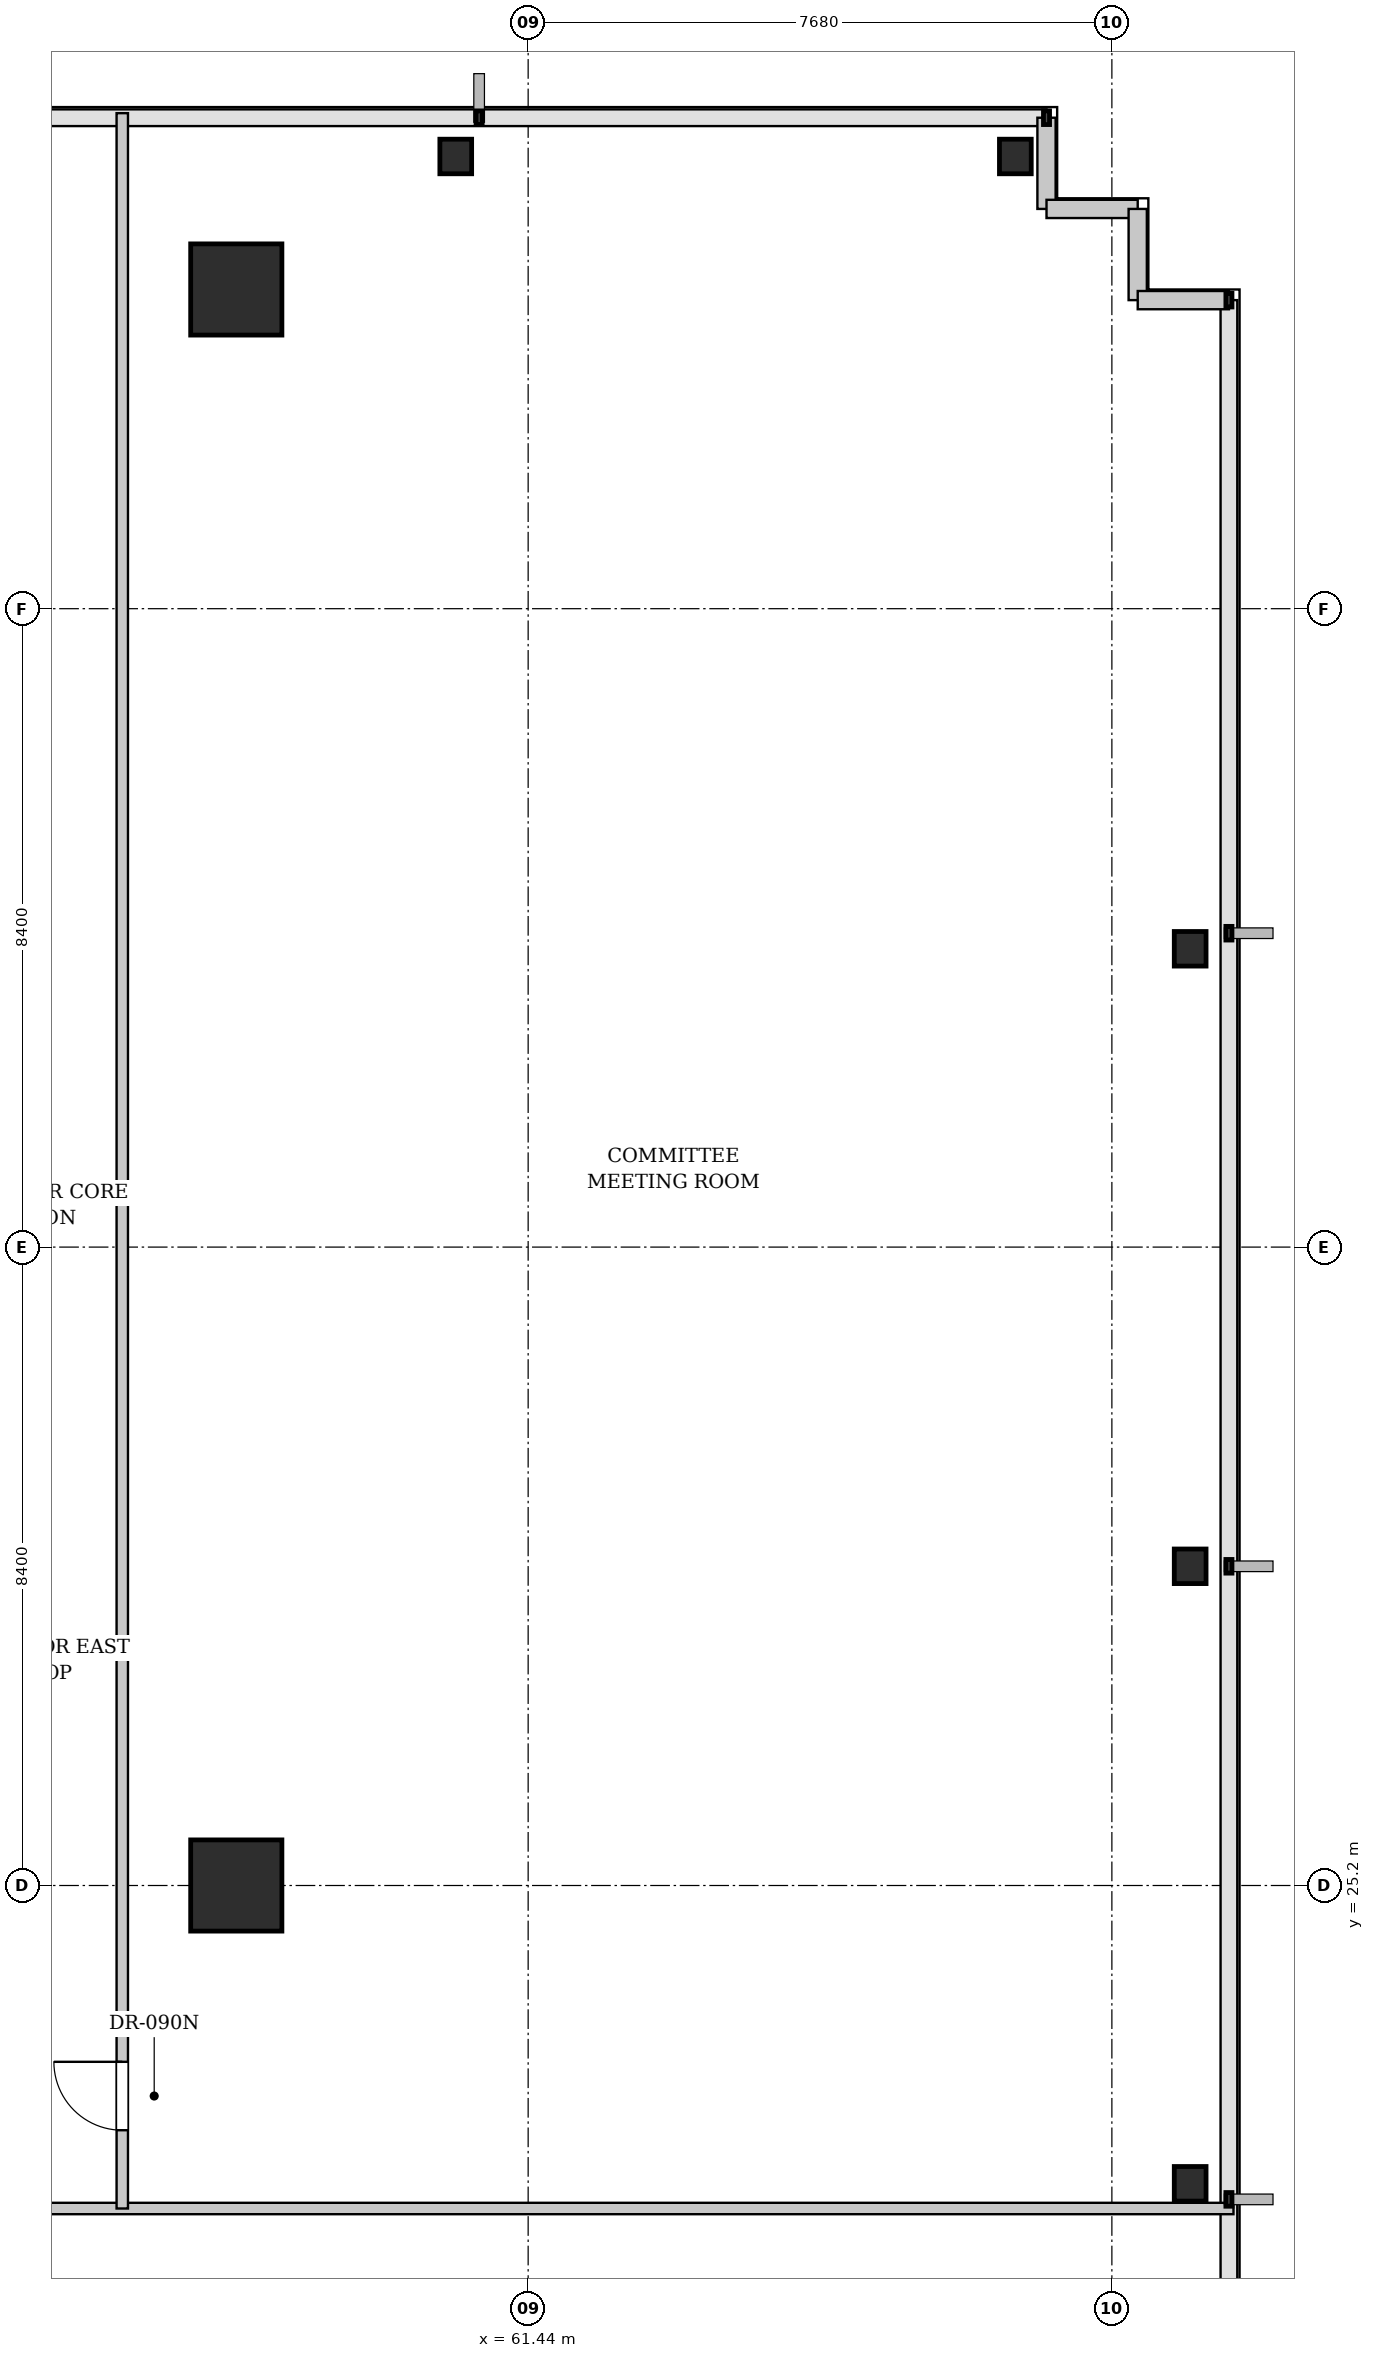
"""IFC4 building model, lengths in metres.
Left out: names, types, materials, properties, quantities, classifications, styles, units other than length and angle.
Written with IfcOpenShell. Run it as: python <this file> out.ifc"""

import sys

from ifc_helpers import new_model, si_unit, direction, frame, frame_2d, origin, origin_2d, place, context, subcontext, project, spatial, rectangle, i_section, extrude, element, fill, save


model = new_model("IFC4")
c1 = context("Model", 3, precision=1e-05, world=origin(), true_north=direction((0.0, 1.0)))
c2 = subcontext(c1, "Body", "Model", "MODEL_VIEW")
j1 = project(units=[si_unit("LENGTHUNIT", "METRE"), si_unit("PLANEANGLEUNIT", "RADIAN")], contexts=[c1])
p1 = place(None, origin())
s1 = spatial("IfcSite", under=j1, at=p1, CompositionType="ELEMENT")
p2 = place(p1, origin())
s2 = spatial("IfcBuilding", under=s1, at=p2, CompositionType="ELEMENT")
p3 = place(p2, frame((0.0, 0.0, 37.2)))
s3 = spatial("IfcBuildingStorey", under=s2, at=p3, CompositionType="ELEMENT", Elevation=37.2)
for number, where, z_axis, x_axis in (
    (1, (57.6, 25.2, 0.0), (0.0, 0.0, 1.0), (1.0, 0.0, 0.0)),
    (2, (57.6, 46.2, 0.0), (0.0, 0.0, 1.0), (1.0, 0.0, 0.0)),
):
    element("IfcColumn", number, at=place(p3, frame(where, z_axis=z_axis, x_axis=x_axis)), inside=s3, PredefinedType="COLUMN", context=c2, shape_type="SweptSolid", body=[
        extrude(rectangle(XDim=1.2, YDim=1.2, at=origin_2d()), origin(), (0.0, 0.0, 1.0), 3.4),
    ])
for number, where, z_axis, x_axis in (
    (3, (60.488, 47.95, 0.0), (0.0, 0.0, 1.0), (1.0, 0.0, 0.0)),
    (4, (67.85, 47.95, 0.0), (0.0, 0.0, 1.0), (1.0, 0.0, 0.0)),
    (5, (70.15, 21.275, 0.0), (0.0, 0.0, 1.0), (1.0, 0.0, 0.0)),
    (6, (70.15, 29.4, 0.0), (0.0, 0.0, 1.0), (1.0, 0.0, 0.0)),
    (7, (70.15, 37.525, 0.0), (0.0, 0.0, 1.0), (1.0, 0.0, 0.0)),
):
    element("IfcColumn", number, at=place(p3, frame(where, z_axis=z_axis, x_axis=x_axis)), inside=s3, PredefinedType="COLUMN", context=c2, shape_type="SweptSolid", body=[
        extrude(i_section(OverallWidth=0.418, OverallDepth=0.455, WebThickness=0.042, FlangeThickness=0.068, FilletRadius=0.015, at=origin_2d()), origin(), (0.0, 0.0, 1.0), 3.4),
    ])
for number, where, z_axis, x_axis in (
    (8, (68.26, 48.46, 0.0), (0.0, 0.0, 1.0), (0.0, -1.0, 0.0)),
    (9, (68.26, 47.26, 0.0), (0.0, 0.0, 1.0), (1.0, 0.0, 0.0)),
    (10, (69.46, 47.26, 0.0), (0.0, 0.0, 1.0), (0.0, -1.0, 0.0)),
    (11, (69.46, 46.06, 0.0), (0.0, 0.0, 1.0), (1.0, 0.0, 0.0)),
):
    element("IfcWall", number, at=place(p3, frame(where, z_axis=z_axis, x_axis=x_axis)), inside=s3, PredefinedType="SOLIDWALL", context=c2, shape_type="SweptSolid", body=[
        extrude(rectangle(XDim=1.2, YDim=0.24, at=frame_2d((0.6, 0.0))), origin(), (0.0, 0.0, 1.0), 3.18),
    ])
p4 = place(p3, frame((6.08, 20.95, 0.0), z_axis=(0.0, 0.0, 1.0), x_axis=(1.0, 0.0, 0.0)))
e12 = element("IfcWall", 12, at=p4, inside=s3, PredefinedType="PARTITIONING", context=c2, shape_type="SweptSolid", body=[
    extrude(rectangle(XDim=64.64, YDim=0.15, at=frame_2d((32.32, 0.0))), origin(), (0.0, 0.0, 1.0), 3.18),
])
p5 = place(p4, frame((17.987, 0.0, 0.0)))
e13 = element("IfcOpeningElement", 13, at=p5, cuts=e12, PredefinedType="OPENING", context=c2, shape_type="SweptSolid", body=[
    extrude(rectangle(XDim=1.0, YDim=2.15, at=frame_2d((0.5, 1.075))), frame((0.0, 0.085, 0.0), z_axis=(0.0, -1.0, 0.0), x_axis=(1.0, 0.0, 0.0)), (0.0, 0.0, 1.0), 0.17),
])
p6 = place(p4, frame((24.477, 0.0, 0.0)))
e14 = element("IfcOpeningElement", 14, at=p6, cuts=e12, PredefinedType="OPENING", context=c2, shape_type="SweptSolid", body=[
    extrude(rectangle(XDim=1.0, YDim=2.15, at=frame_2d((0.5, 1.075))), frame((0.0, 0.085, 0.0), z_axis=(0.0, -1.0, 0.0), x_axis=(1.0, 0.0, 0.0)), (0.0, 0.0, 1.0), 0.17),
])
p7 = place(p4, frame((29.823, 0.0, 0.0)))
e15 = element("IfcOpeningElement", 15, at=p7, cuts=e12, PredefinedType="OPENING", context=c2, shape_type="SweptSolid", body=[
    extrude(rectangle(XDim=1.0, YDim=2.15, at=frame_2d((0.5, 1.075))), frame((0.0, 0.085, 0.0), z_axis=(0.0, -1.0, 0.0), x_axis=(1.0, 0.0, 0.0)), (0.0, 0.0, 1.0), 0.17),
])
p8 = place(p4, frame((35.169, 0.0, 0.0)))
e16 = element("IfcOpeningElement", 16, at=p8, cuts=e12, PredefinedType="OPENING", context=c2, shape_type="SweptSolid", body=[
    extrude(rectangle(XDim=1.0, YDim=2.15, at=frame_2d((0.5, 1.075))), frame((0.0, 0.085, 0.0), z_axis=(0.0, -1.0, 0.0), x_axis=(1.0, 0.0, 0.0)), (0.0, 0.0, 1.0), 0.17),
])
p9 = place(p4, frame((40.043, 0.0, 0.0)))
e17 = element("IfcOpeningElement", 17, at=p9, cuts=e12, PredefinedType="OPENING", context=c2, shape_type="SweptSolid", body=[
    extrude(rectangle(XDim=1.0, YDim=2.15, at=frame_2d((0.5, 1.075))), frame((0.0, 0.085, 0.0), z_axis=(0.0, -1.0, 0.0), x_axis=(1.0, 0.0, 0.0)), (0.0, 0.0, 1.0), 0.17),
])
p10 = place(p4, frame((45.883, 0.0, 0.0)))
e18 = element("IfcOpeningElement", 18, at=p10, cuts=e12, PredefinedType="OPENING", context=c2, shape_type="SweptSolid", body=[
    extrude(rectangle(XDim=1.0, YDim=2.15, at=frame_2d((0.5, 1.075))), frame((0.0, 0.085, 0.0), z_axis=(0.0, -1.0, 0.0), x_axis=(1.0, 0.0, 0.0)), (0.0, 0.0, 1.0), 0.17),
])
p11 = place(p3, frame((56.1, 20.95, 0.0), z_axis=(0.0, 0.0, 1.0), x_axis=(0.0, 1.0, 0.0)))
e19 = element("IfcWall", 19, at=p11, inside=s3, PredefinedType="PARTITIONING", context=c2, shape_type="SweptSolid", body=[
    extrude(rectangle(XDim=27.57, YDim=0.15, at=frame_2d((13.785, 0.0))), origin(), (0.0, 0.0, 1.0), 3.18),
])
p12 = place(p11, frame((1.03, 0.0, 0.0)))
e20 = element("IfcOpeningElement", 20, at=p12, cuts=e19, PredefinedType="OPENING", context=c2, shape_type="SweptSolid", body=[
    extrude(rectangle(XDim=0.9, YDim=2.15, at=frame_2d((0.45, 1.075))), frame((0.0, 0.085, 0.0), z_axis=(0.0, -1.0, 0.0), x_axis=(1.0, 0.0, 0.0)), (0.0, 0.0, 1.0), 0.17),
])
p13 = place(p12, origin())
e21 = element("IfcDoor", 21, at=p13, inside=s3, OperationType="SINGLE_SWING_RIGHT", PredefinedType="DOOR", context=c2, shape_type="SweptSolid", body=[
    extrude(rectangle(XDim=0.9, YDim=2.15, at=frame_2d((0.45, 1.075))), frame((0.0, 0.025, 0.0), z_axis=(0.0, -1.0, 0.0), x_axis=(1.0, 0.0, 0.0)), (0.0, 0.0, 1.0), 0.05),
])
fill(e20, e21)
save(model, sys.argv[1])
